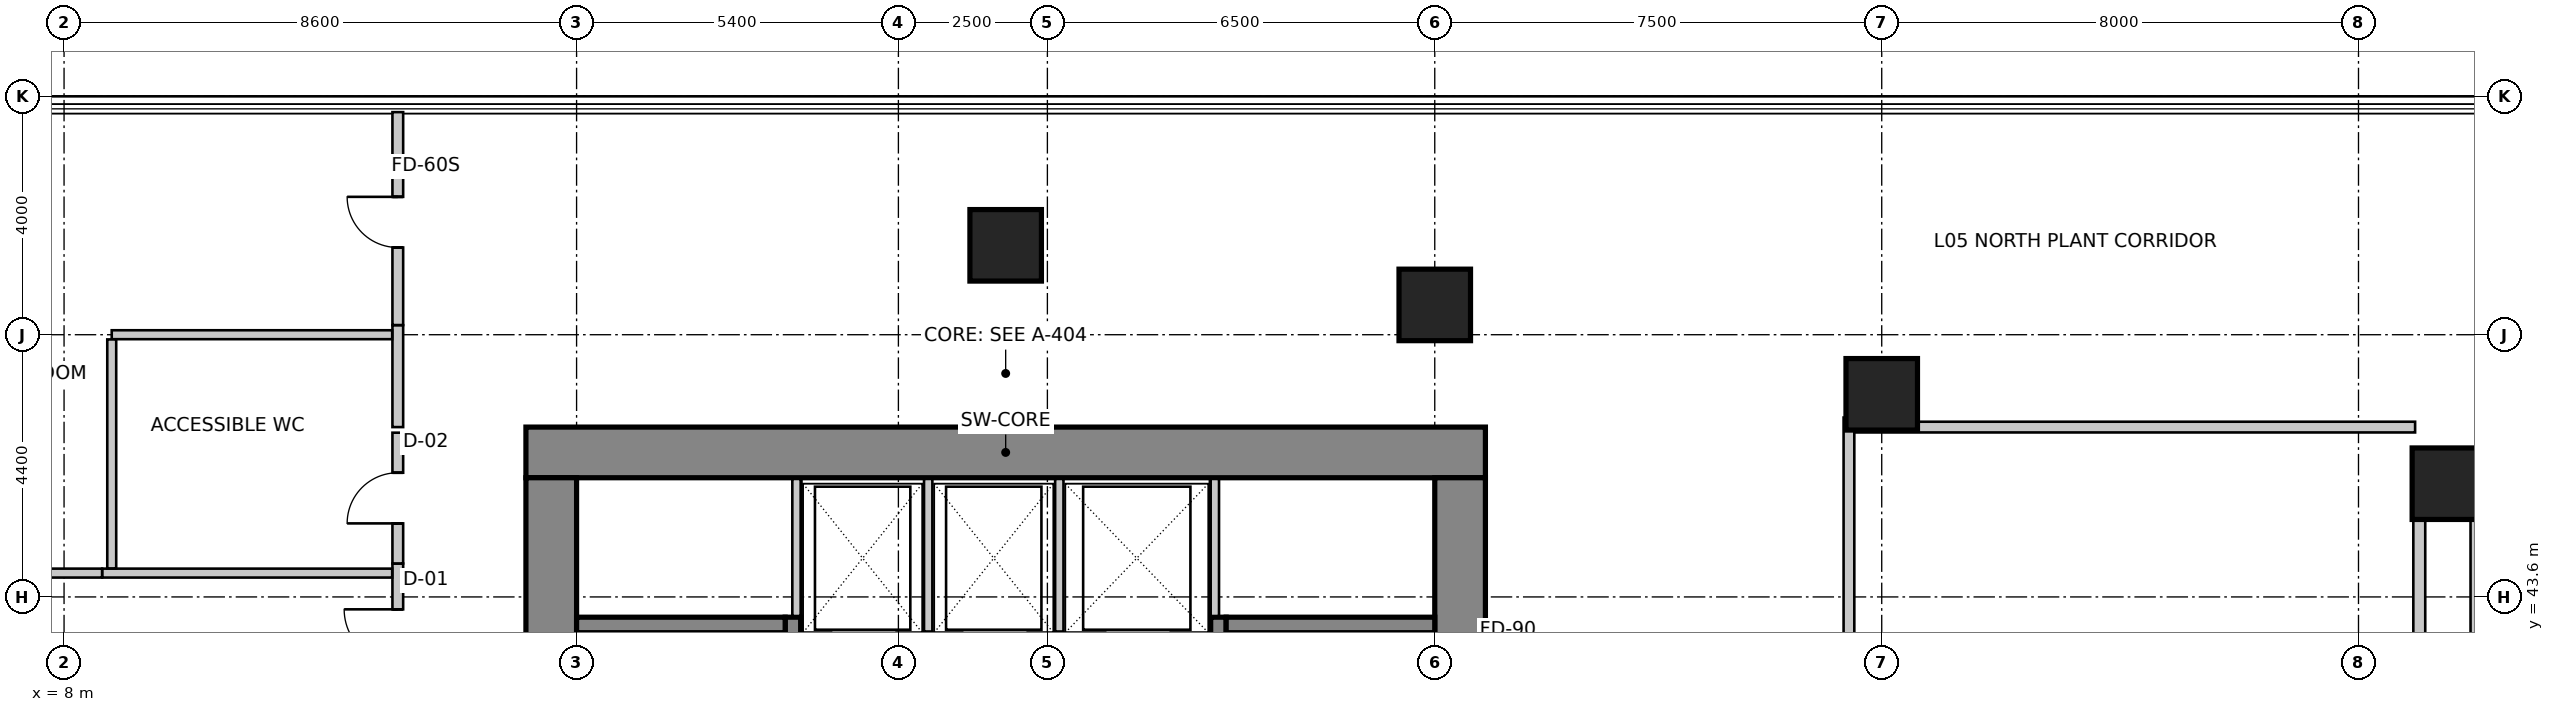
"""IFC4 building model, lengths in metres.
Left out: names, types, materials, properties, quantities, classifications, styles, units other than length and angle.
Written with IfcOpenShell. Run it as: python <this file> out.ifc"""

import sys

from ifc_helpers import new_model, si_unit, direction, frame, frame_2d, origin, origin_2d, place, context, subcontext, project, spatial, rectangle, extrude, source, transform, mapped, element, fill, save


model = new_model("IFC4")
c1 = context("Model", 3, precision=1e-05, world=origin(), true_north=direction((0.0, 1.0)))
c2 = subcontext(c1, "Body", "Model", "MODEL_VIEW")
j1 = project(units=[si_unit("LENGTHUNIT", "METRE"), si_unit("PLANEANGLEUNIT", "RADIAN")], contexts=[c1])
p1 = place(None, origin())
s1 = spatial("IfcSite", under=j1, at=p1, CompositionType="ELEMENT")
p2 = place(p1, origin())
s2 = spatial("IfcBuilding", under=s1, at=p2, CompositionType="ELEMENT")
p3 = place(p2, frame((0.0, 0.0, 21.6)))
s3 = spatial("IfcBuildingStorey", under=s2, at=p3, CompositionType="ELEMENT", Elevation=21.6)
p4 = place(p3, frame((15.75, 46.025, 0.0), z_axis=(0.0, 0.0, 1.0), x_axis=(1.0, 0.0, 0.0)))
e1 = element("IfcWall", 1, at=p4, inside=s3, PredefinedType="SHEAR", context=c2, shape_type="SweptSolid", body=[
    extrude(rectangle(XDim=16.1, YDim=0.85, at=frame_2d((8.05, 0.0))), origin(), (0.0, 0.0, 1.0), 5.4),
])
p5 = place(p3, frame((16.175, 34.2, 0.0), z_axis=(0.0, 0.0, 1.0), x_axis=(0.0, 1.0, 0.0)))
e2 = element("IfcWall", 2, at=p5, inside=s3, PredefinedType="SHEAR", context=c2, shape_type="SweptSolid", body=[
    extrude(rectangle(XDim=11.4, YDim=0.85, at=frame_2d((5.7, 0.0))), origin(), (0.0, 0.0, 1.0), 5.4),
])
m1 = source(origin(), c2, "Body", "SweptSolid", [
    extrude(rectangle(XDim=1.1, YDim=2.15, at=frame_2d((0.55, 1.075))), frame((0.0, 0.435, 0.0), z_axis=(0.0, -1.0, 0.0), x_axis=(1.0, 0.0, 0.0)), (0.0, 0.0, 1.0), 0.87),
])
p6 = place(p5, frame((7.15, 0.0, 0.0)))
e3 = element("IfcOpeningElement", 3, at=p6, cuts=e2, PredefinedType="OPENING", context=c2, shape_type="MappedRepresentation", body=[
    mapped(m1, transform((0.0, 0.0, 0.0), scale=1.0)),
])
p7 = place(p3, frame((31.425, 34.2, 0.0), z_axis=(0.0, 0.0, 1.0), x_axis=(0.0, 1.0, 0.0)))
e4 = element("IfcWall", 4, at=p7, inside=s3, PredefinedType="SHEAR", context=c2, shape_type="SweptSolid", body=[
    extrude(rectangle(XDim=11.4, YDim=0.85, at=frame_2d((5.7, 0.0))), origin(), (0.0, 0.0, 1.0), 5.4),
])
p8 = place(p7, frame((7.35, 0.0, 0.0)))
e5 = element("IfcOpeningElement", 5, at=p8, cuts=e4, PredefinedType="OPENING", context=c2, shape_type="MappedRepresentation", body=[
    mapped(m1, transform((0.0, 0.0, 0.0), scale=1.0)),
])
p9 = place(p3, frame((20.23, 34.2, 0.0), z_axis=(0.0, 0.0, 1.0), x_axis=(0.0, 1.0, 0.0)))
e6 = element("IfcWall", 6, at=p9, inside=s3, PredefinedType="SHEAR", context=c2, shape_type="SweptSolid", body=[
    extrude(rectangle(XDim=9.06, YDim=0.26, at=frame_2d((4.53, 0.0))), origin(), (0.0, 0.0, 1.0), 5.4),
])
m2 = source(origin(), c2, "Body", "SweptSolid", [
    extrude(rectangle(XDim=1.1, YDim=2.15, at=frame_2d((0.55, 1.075))), frame((0.0, 0.14, 0.0), z_axis=(0.0, -1.0, 0.0), x_axis=(1.0, 0.0, 0.0)), (0.0, 0.0, 1.0), 0.28),
])
p10 = place(p9, frame((7.45, 0.0, 0.0)))
e7 = element("IfcOpeningElement", 7, at=p10, cuts=e6, PredefinedType="OPENING", context=c2, shape_type="MappedRepresentation", body=[
    mapped(m2, transform((0.0, 0.0, 0.0), scale=1.0)),
])
p11 = place(p3, frame((27.37, 34.2, 0.0), z_axis=(0.0, 0.0, 1.0), x_axis=(0.0, 1.0, 0.0)))
e8 = element("IfcWall", 8, at=p11, inside=s3, PredefinedType="SHEAR", context=c2, shape_type="SweptSolid", body=[
    extrude(rectangle(XDim=9.06, YDim=0.26, at=frame_2d((4.53, 0.0))), origin(), (0.0, 0.0, 1.0), 5.4),
])
p12 = place(p11, frame((7.45, 0.0, 0.0)))
e9 = element("IfcOpeningElement", 9, at=p12, cuts=e8, PredefinedType="OPENING", context=c2, shape_type="MappedRepresentation", body=[
    mapped(m2, transform((0.0, 0.0, 0.0), scale=1.0)),
])
for number, where, z_axis, x_axis in (
    (10, (16.6, 43.13, 0.0), (0.0, 0.0, 1.0), (1.0, 0.0, 0.0)),
    (11, (27.5, 43.13, 0.0), (0.0, 0.0, 1.0), (1.0, 0.0, 0.0)),
):
    element("IfcWall", number, at=place(p3, frame(where, z_axis=z_axis, x_axis=x_axis)), inside=s3, PredefinedType="SHEAR", context=c2, shape_type="SweptSolid", body=[
        extrude(rectangle(XDim=3.5, YDim=0.26, at=frame_2d((1.75, 0.0))), origin(), (0.0, 0.0, 1.0), 5.4),
    ])
m3 = source(origin(), c2, "Body", "SweptSolid", [
    extrude(rectangle(XDim=1.2, YDim=1.2, at=origin_2d()), origin(), (0.0, 0.0, 1.0), 5.4),
])
for number, where, z_axis, x_axis in (
    (12, (23.8, 49.5, 0.0), (0.0, 0.0, 1.0), (1.0, 0.0, 0.0)),
    (13, (31.0, 48.5, 0.0), (0.0, 0.0, 1.0), (1.0, 0.0, 0.0)),
    (14, (38.5, 47.0, 0.0), (0.0, 0.0, 1.0), (1.0, 0.0, 0.0)),
    (15, (48.0, 45.5, 0.0), (0.0, 0.0, 1.0), (1.0, 0.0, 0.0)),
):
    element("IfcColumn", number, at=place(p3, frame(where, z_axis=z_axis, x_axis=x_axis)), inside=s3, PredefinedType="COLUMN", context=c2, shape_type="MappedRepresentation", body=[
        mapped(m3, transform((0.0, 0.0, 0.0), scale=1.0)),
    ])
for number, where, z_axis, x_axis in (
    (16, (20.29, 43.28, 0.0), (0.0, 0.0, 1.0), (0.0, 1.0, 0.0)),
    (17, (27.31, 43.28, 0.0), (0.0, 0.0, 1.0), (0.0, 1.0, 0.0)),
):
    element("IfcWall", number, at=place(p3, frame(where, z_axis=z_axis, x_axis=x_axis)), inside=s3, PredefinedType="SOLIDWALL", context=c2, shape_type="SweptSolid", body=[
        extrude(rectangle(XDim=2.3, YDim=0.14, at=frame_2d((1.15, 0.0))), origin(), (0.0, 0.0, 1.0), 5.05),
    ])
for number, where, z_axis, x_axis in (
    (18, (22.5, 43.02, 0.0), (0.0, 0.0, 1.0), (0.0, 1.0, 0.0)),
    (19, (24.7, 43.02, 0.0), (0.0, 0.0, 1.0), (0.0, 1.0, 0.0)),
):
    element("IfcWall", number, at=place(p3, frame(where, z_axis=z_axis, x_axis=x_axis)), inside=s3, PredefinedType="SOLIDWALL", context=c2, shape_type="SweptSolid", body=[
        extrude(rectangle(XDim=2.56, YDim=0.14, at=frame_2d((1.28, 0.0))), origin(), (0.0, 0.0, 1.0), 5.05),
    ])
p13 = place(p3, frame((37.95, 46.61, 0.0), z_axis=(0.0, 0.0, 1.0), x_axis=(0.0, -1.0, 0.0)))
e20 = element("IfcWall", 20, at=p13, inside=s3, PredefinedType="PARTITIONING", context=c2, shape_type="SweptSolid", body=[
    extrude(rectangle(XDim=12.27, YDim=0.18, at=frame_2d((6.135, 0.0))), origin(), (0.0, 0.0, 1.0), 5.05),
])
m4 = source(origin(), c2, "Body", "SweptSolid", [
    extrude(rectangle(XDim=1.1, YDim=2.15, at=frame_2d((0.55, 1.075))), frame((0.0, 0.1, 0.0), z_axis=(0.0, -1.0, 0.0), x_axis=(1.0, 0.0, 0.0)), (0.0, 0.0, 1.0), 0.2),
])
p14 = place(p13, frame((5.585, 0.0, 0.0)))
e21 = element("IfcOpeningElement", 21, at=p14, cuts=e20, PredefinedType="OPENING", context=c2, shape_type="MappedRepresentation", body=[
    mapped(m4, transform((0.0, 0.0, 0.0), scale=1.0)),
])
p15 = place(p3, frame((13.6, 46.45, 0.0), z_axis=(0.0, 0.0, 1.0), x_axis=(0.0, 1.0, 0.0)))
e22 = element("IfcWall", 22, at=p15, inside=s3, PredefinedType="PARTITIONING", context=c2, shape_type="SweptSolid", body=[
    extrude(rectangle(XDim=1.71, YDim=0.18, at=frame_2d((0.855, 0.0))), origin(), (0.0, 0.0, 1.0), 5.05),
])
p16 = place(p3, frame((13.6, 48.162, 0.0), z_axis=(0.0, 0.0, 1.0), x_axis=(0.0, 1.0, 0.0)))
e23 = element("IfcWall", 23, at=p16, inside=s3, PredefinedType="PARTITIONING", context=c2, shape_type="SweptSolid", body=[
    extrude(rectangle(XDim=3.573, YDim=0.18, at=frame_2d((1.787, 0.0))), origin(), (0.0, 0.0, 1.0), 5.05),
])
m5 = source(origin(), c2, "Body", "SweptSolid", [
    extrude(rectangle(XDim=0.85, YDim=2.15, at=frame_2d((0.425, 1.075))), frame((0.0, 0.1, 0.0), z_axis=(0.0, -1.0, 0.0), x_axis=(1.0, 0.0, 0.0)), (0.0, 0.0, 1.0), 0.2),
])
p17 = place(p16, frame((1.302, 0.0, 0.0)))
e24 = element("IfcOpeningElement", 24, at=p17, cuts=e23, PredefinedType="OPENING", context=c2, shape_type="MappedRepresentation", body=[
    mapped(m5, transform((0.0, 0.0, 0.0), scale=1.0)),
])
p18 = place(p3, frame((47.45, 46.45, 0.0), z_axis=(0.0, 0.0, 1.0), x_axis=(-1.0, 0.0, 0.0)))
e25 = element("IfcWall", 25, at=p18, inside=s3, PredefinedType="PARTITIONING", context=c2, shape_type="SweptSolid", body=[
    extrude(rectangle(XDim=9.406, YDim=0.18, at=frame_2d((4.703, 0.0))), origin(), (0.0, 0.0, 1.0), 3.842),
])
p19 = place(p3, frame((13.6, 39.162, 0.0), z_axis=(0.0, 0.0, 1.0), x_axis=(0.0, 1.0, 0.0)))
e26 = element("IfcWall", 26, at=p19, inside=s3, PredefinedType="PARTITIONING", context=c2, shape_type="SweptSolid", body=[
    extrude(rectangle(XDim=4.998, YDim=0.18, at=frame_2d((2.499, 0.0))), origin(), (0.0, 0.0, 1.0), 3.842),
])
m6 = source(origin(), c2, "Body", "SweptSolid", [
    extrude(rectangle(XDim=0.9, YDim=2.15, at=frame_2d((0.45, 1.075))), frame((0.0, 0.1, 0.0), z_axis=(0.0, -1.0, 0.0), x_axis=(1.0, 0.0, 0.0)), (0.0, 0.0, 1.0), 0.2),
])
p20 = place(p19, frame((3.33, 0.0, 0.0)))
e27 = element("IfcOpeningElement", 27, at=p20, cuts=e26, PredefinedType="OPENING", context=c2, shape_type="MappedRepresentation", body=[
    mapped(m6, transform((0.0, 0.0, 0.0), scale=1.0)),
])
p21 = place(p3, frame((13.6, 44.162, 0.0), z_axis=(0.0, 0.0, 1.0), x_axis=(0.0, 1.0, 0.0)))
e28 = element("IfcWall", 28, at=p21, inside=s3, PredefinedType="PARTITIONING", context=c2, shape_type="SweptSolid", body=[
    extrude(rectangle(XDim=2.194, YDim=0.18, at=frame_2d((1.097, 0.0))), origin(), (0.0, 0.0, 1.0), 5.05),
])
p22 = place(p21, frame((0.672, 0.0, 0.0)))
e29 = element("IfcOpeningElement", 29, at=p22, cuts=e28, PredefinedType="OPENING", context=c2, shape_type="MappedRepresentation", body=[
    mapped(m5, transform((0.0, 0.0, 0.0), scale=1.0)),
])
p23 = place(p3, frame((8.64, 44.0, 0.0), z_axis=(0.0, 0.0, 1.0), x_axis=(1.0, 0.0, 0.0)))
e30 = element("IfcWall", 30, at=p23, inside=s3, PredefinedType="PARTITIONING", context=c2, shape_type="SweptSolid", body=[
    extrude(rectangle(XDim=4.866, YDim=0.15, at=frame_2d((2.433, 0.0))), origin(), (0.0, 0.0, 1.0), 5.05),
])
p24 = place(p3, frame((5.879, 44.0, 0.0), z_axis=(0.0, 0.0, 1.0), x_axis=(1.0, 0.0, 0.0)))
e31 = element("IfcWall", 31, at=p24, inside=s3, PredefinedType="PARTITIONING", context=c2, shape_type="SweptSolid", body=[
    extrude(rectangle(XDim=2.759, YDim=0.15, at=frame_2d((1.379, 0.0))), origin(), (0.0, 0.0, 1.0), 3.842),
])
p25 = place(p3, frame((8.8, 48.0, 0.0), z_axis=(0.0, 0.0, 1.0), x_axis=(1.0, 0.0, 0.0)))
e32 = element("IfcWall", 32, at=p25, inside=s3, PredefinedType="PARTITIONING", context=c2, shape_type="SweptSolid", body=[
    extrude(rectangle(XDim=4.706, YDim=0.15, at=frame_2d((2.353, 0.0))), origin(), (0.0, 0.0, 1.0), 5.05),
])
p26 = place(p3, frame((8.8, 44.079, 0.0), z_axis=(0.0, 0.0, 1.0), x_axis=(0.0, 1.0, 0.0)))
e33 = element("IfcWall", 33, at=p26, inside=s3, PredefinedType="PARTITIONING", context=c2, shape_type="SweptSolid", body=[
    extrude(rectangle(XDim=3.842, YDim=0.15, at=frame_2d((1.921, 0.0))), origin(), (0.0, 0.0, 1.0), 5.05),
])
for number, where, z_axis, x_axis in (
    (34, (48.48, 46.0, 0.0), (0.0, 0.0, 1.0), (0.0, -1.0, 0.0)),
    (35, (47.52, 34.64, 0.0), (0.0, 0.0, 1.0), (0.0, 1.0, 0.0)),
):
    element("IfcWall", number, at=place(p3, frame(where, z_axis=z_axis, x_axis=x_axis)), inside=s3, PredefinedType="SOLIDWALL", context=c2, shape_type="SweptSolid", body=[
        extrude(rectangle(XDim=11.36, YDim=0.2, at=frame_2d((5.68, 0.0))), origin(), (0.0, 0.0, 1.0), 3.042),
    ])
m7 = source(origin(), c2, "Body", "SweptSolid", [
    extrude(rectangle(XDim=0.9, YDim=2.15, at=frame_2d((0.45, 1.075))), frame((0.0, 0.025, 0.0), z_axis=(0.0, -1.0, 0.0), x_axis=(1.0, 0.0, 0.0)), (0.0, 0.0, 1.0), 0.05),
])
p27 = place(p20, origin())
e36 = element("IfcDoor", 36, at=p27, inside=s3, OperationType="SINGLE_SWING_RIGHT", PredefinedType="DOOR", context=c2, shape_type="MappedRepresentation", body=[
    mapped(m7, transform((0.0, 0.0, 0.0), scale=1.0)),
])
fill(e27, e36)
m8 = source(origin(), c2, "Body", "SweptSolid", [
    extrude(rectangle(XDim=0.85, YDim=2.15, at=frame_2d((0.425, 1.075))), frame((0.0, 0.025, 0.0), z_axis=(0.0, -1.0, 0.0), x_axis=(1.0, 0.0, 0.0)), (0.0, 0.0, 1.0), 0.05),
])
p28 = place(p22, origin())
e37 = element("IfcDoor", 37, at=p28, inside=s3, OperationType="SINGLE_SWING_LEFT", PredefinedType="DOOR", context=c2, shape_type="MappedRepresentation", body=[
    mapped(m8, transform((0.0, 0.0, 0.0), scale=1.0)),
])
fill(e29, e37)
m9 = source(origin(), c2, "Body", "SweptSolid", [
    extrude(rectangle(XDim=0.85, YDim=2.15, at=frame_2d((0.425, 1.075))), frame((0.0, 0.025, 0.0), z_axis=(0.0, -1.0, 0.0), x_axis=(1.0, 0.0, 0.0)), (0.0, 0.0, 1.0), 0.05),
])
p29 = place(p17, origin())
e38 = element("IfcDoor", 38, at=p29, inside=s3, OperationType="SINGLE_SWING_RIGHT", PredefinedType="DOOR", context=c2, shape_type="MappedRepresentation", body=[
    mapped(m9, transform((0.0, 0.0, 0.0), scale=1.0)),
])
fill(e24, e38)
save(model, sys.argv[1])
